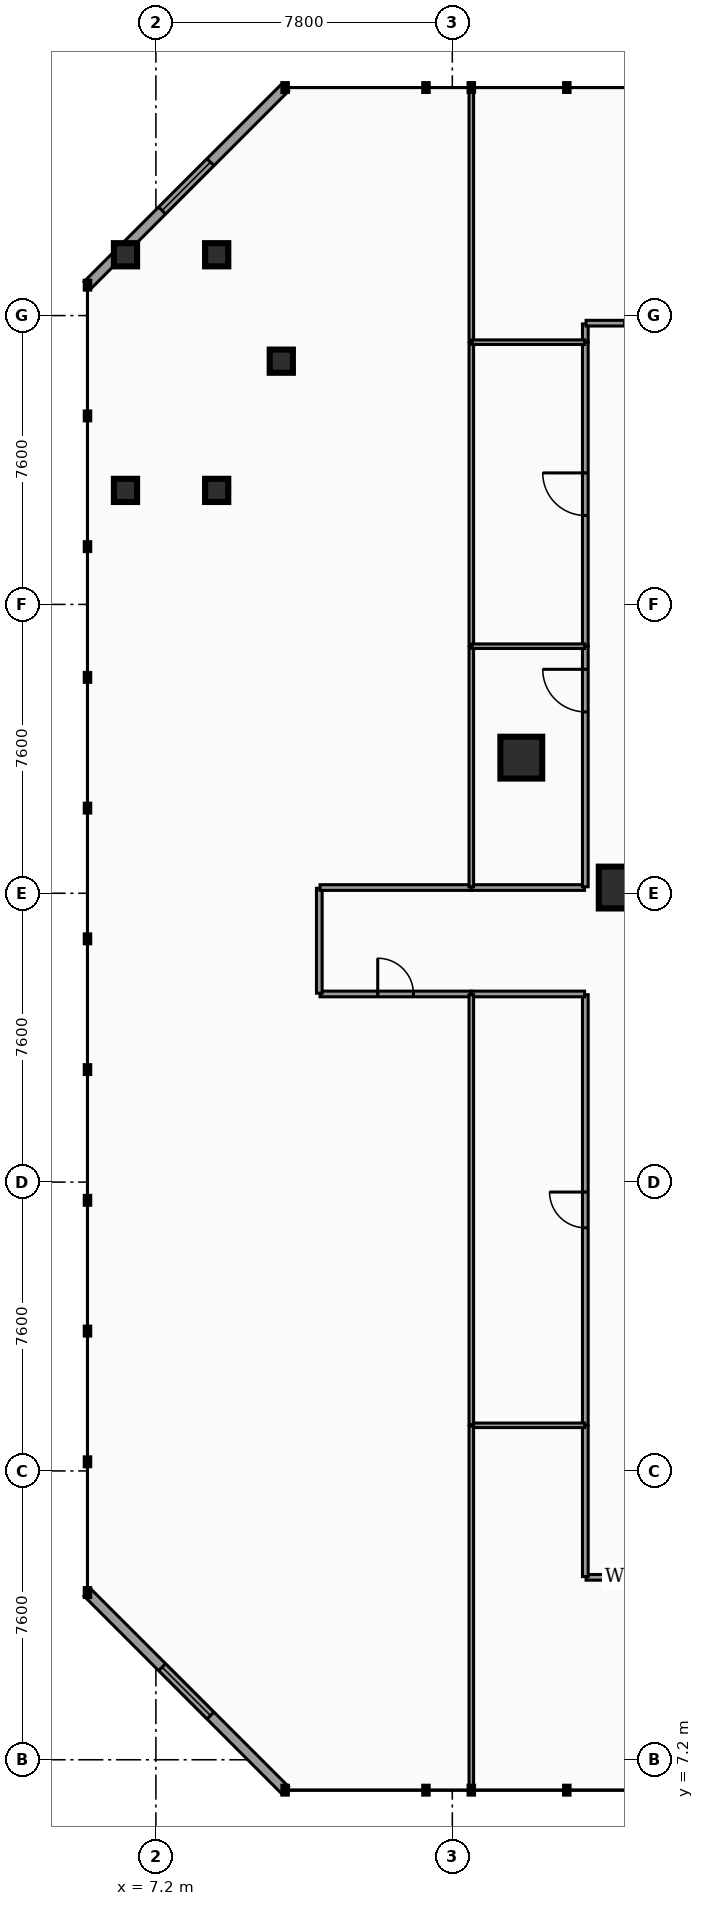
"""IFC4 building model, lengths in metres.
Left out: names, types, materials, properties, quantities, classifications, styles, units other than length and angle.
Written with IfcOpenShell. Run it as: python <this file> out.ifc"""

import sys

from ifc_helpers import new_model, si_unit, direction, frame, frame_2d, origin, origin_2d, place, context, subcontext, project, spatial, rectangle, hollow_rectangle, hollow_circle, extrude, element, fill, save


model = new_model("IFC4")
c1 = context("Model", 3, precision=1e-05, world=origin(), true_north=direction((0.0, 1.0)))
c2 = subcontext(c1, "Body", "Model", "MODEL_VIEW")
j1 = project(units=[si_unit("LENGTHUNIT", "METRE"), si_unit("PLANEANGLEUNIT", "RADIAN")], contexts=[c1])
p1 = place(None, origin())
s1 = spatial("IfcSite", under=j1, at=p1, CompositionType="ELEMENT")
p2 = place(p1, origin())
s2 = spatial("IfcBuilding", under=s1, at=p2, CompositionType="ELEMENT")
p3 = place(p2, frame((0.0, 0.0, 18.36)))
s3 = spatial("IfcBuildingStorey", under=s2, at=p3, CompositionType="ELEMENT", Elevation=18.36)
for number, where, z_axis, x_axis in (
    (1, (16.815, 33.568, 0.0), (0.0, 0.0, 1.0), (1.0, 0.0, 0.0)),
    (2, (19.405, 30.15, 0.0), (0.0, 0.0, 1.0), (1.0, 0.0, 0.0)),
):
    element("IfcColumn", number, at=place(p3, frame(where, z_axis=z_axis, x_axis=x_axis)), inside=s3, PredefinedType="COLUMN", context=c2, shape_type="SweptSolid", body=[
        extrude(hollow_rectangle(XDim=1.1, YDim=1.1, WallThickness=0.055, at=origin_2d()), origin(), (0.0, 0.0, 1.0), 4.07),
    ])
p4 = place(p3, frame((10.5, 44.0, 0.0), z_axis=(0.0, 0.0, 1.0), x_axis=(1.0, 0.0, 0.0)))
e3 = element("IfcColumn", 3, at=p4, inside=s3, PredefinedType="COLUMN", context=c2, shape_type="SweptSolid", body=[
    extrude(hollow_circle(Radius=0.305, WallThickness=0.025, at=origin_2d()), origin(), (0.0, 0.0, 1.0), 4.14),
])
for number, where, z_axis, x_axis in (
    (4, (6.4, 40.6, 0.0), (0.0, 0.0, 1.0), (1.0, 0.0, 0.0)),
    (5, (8.8, 40.6, 0.0), (0.0, 0.0, 1.0), (1.0, 0.0, 0.0)),
    (6, (6.4, 46.8, 0.0), (0.0, 0.0, 1.0), (1.0, 0.0, 0.0)),
    (7, (8.8, 46.8, 0.0), (0.0, 0.0, 1.0), (1.0, 0.0, 0.0)),
):
    element("IfcColumn", number, at=place(p3, frame(where, z_axis=z_axis, x_axis=x_axis)), inside=s3, PredefinedType="COLUMN", context=c2, shape_type="SweptSolid", body=[
        extrude(hollow_circle(Radius=0.305, WallThickness=0.025, at=origin_2d()), origin(), (0.0, 0.0, 1.0), 4.07),
    ])
p5 = place(p3, frame((5.4, 46.0, 0.0), z_axis=(0.0, 0.0, 1.0), x_axis=(0.707123380132, 0.707090181851, 0.0)))
e8 = element("IfcWall", 8, at=p5, inside=s3, PredefinedType="STANDARD", context=c2, shape_type="SweptSolid", body=[
    extrude(rectangle(XDim=7.354, YDim=0.26, at=frame_2d((3.677, 0.0))), origin(), (0.0, 0.0, 1.0), 3.65),
])
p6 = place(p5, frame((2.777, 0.0, 0.7)))
e9 = element("IfcOpeningElement", 9, at=p6, cuts=e8, PredefinedType="OPENING", context=c2, shape_type="SweptSolid", body=[
    extrude(rectangle(XDim=1.8, YDim=2.1, at=frame_2d((0.9, 1.05))), frame((0.0, 0.14, 0.0), z_axis=(0.0, -1.0, 0.0), x_axis=(1.0, 0.0, 0.0)), (0.0, 0.0, 1.0), 0.28),
])
p7 = place(p3, frame((5.4, 11.6, 0.0), z_axis=(0.0, 0.0, 1.0), x_axis=(0.707106781187, -0.707106781187, 0.0)))
e10 = element("IfcWall", 10, at=p7, inside=s3, PredefinedType="STANDARD", context=c2, shape_type="SweptSolid", body=[
    extrude(rectangle(XDim=7.354, YDim=0.26, at=frame_2d((3.677, 0.0))), origin(), (0.0, 0.0, 1.0), 3.65),
])
p8 = place(p7, frame((2.777, 0.0, 0.7)))
e11 = element("IfcOpeningElement", 11, at=p8, cuts=e10, PredefinedType="OPENING", context=c2, shape_type="SweptSolid", body=[
    extrude(rectangle(XDim=1.8, YDim=2.1, at=frame_2d((0.9, 1.05))), frame((0.0, 0.14, 0.0), z_axis=(0.0, -1.0, 0.0), x_axis=(1.0, 0.0, 0.0)), (0.0, 0.0, 1.0), 0.28),
])
p9 = place(p3, frame((18.52, 12.0, 0.0), z_axis=(0.0, 0.0, 1.0), x_axis=(1.0, 0.0, 0.0)))
e12 = element("IfcWall", 12, at=p9, inside=s3, PredefinedType="PARTITIONING", context=c2, shape_type="SweptSolid", body=[
    extrude(rectangle(XDim=2.96, YDim=0.15, at=frame_2d((1.48, 0.0))), origin(), (0.0, 0.0, 1.0), 3.027),
])
p10 = place(p3, frame((18.5, 12.02, 0.0), z_axis=(0.0, 0.0, 1.0), x_axis=(0.0, 1.0, 0.0)))
e13 = element("IfcWall", 13, at=p10, inside=s3, PredefinedType="PARTITIONING", context=c2, shape_type="SweptSolid", body=[
    extrude(rectangle(XDim=3.975, YDim=0.15, at=frame_2d((1.988, 0.0))), origin(), (0.0, 0.0, 1.0), 3.027),
])
p11 = place(p3, frame((18.5, 16.005, 0.0), z_axis=(0.0, 0.0, 1.0), x_axis=(0.0, 1.0, 0.0)))
e14 = element("IfcWall", 14, at=p11, inside=s3, PredefinedType="PARTITIONING", context=c2, shape_type="SweptSolid", body=[
    extrude(rectangle(XDim=11.325, YDim=0.15, at=frame_2d((5.663, 0.0))), origin(), (0.0, 0.0, 1.0), 3.027),
])
p12 = place(p11, frame((5.192, 0.0, 0.0)))
e15 = element("IfcOpeningElement", 15, at=p12, cuts=e14, PredefinedType="OPENING", context=c2, shape_type="SweptSolid", body=[
    extrude(rectangle(XDim=0.94, YDim=2.05, at=frame_2d((0.47, 1.025))), frame((0.0, 0.085, 0.0), z_axis=(0.0, -1.0, 0.0), x_axis=(1.0, 0.0, 0.0)), (0.0, 0.0, 1.0), 0.17),
])
p13 = place(p3, frame((15.505, 27.35, 0.0), z_axis=(0.0, 0.0, 1.0), x_axis=(1.0, 0.0, 0.0)))
e16 = element("IfcWall", 16, at=p13, inside=s3, PredefinedType="PARTITIONING", context=c2, shape_type="SweptSolid", body=[
    extrude(rectangle(XDim=2.975, YDim=0.15, at=frame_2d((1.488, 0.0))), origin(), (0.0, 0.0, 1.0), 3.027),
])
p14 = place(p3, frame((11.52, 27.35, 0.0), z_axis=(0.0, 0.0, 1.0), x_axis=(1.0, 0.0, 0.0)))
e17 = element("IfcWall", 17, at=p14, inside=s3, PredefinedType="PARTITIONING", context=c2, shape_type="SweptSolid", body=[
    extrude(rectangle(XDim=3.975, YDim=0.15, at=frame_2d((1.988, 0.0))), origin(), (0.0, 0.0, 1.0), 3.027),
])
p15 = place(p14, frame((1.518, 0.0, 0.0)))
e18 = element("IfcOpeningElement", 18, at=p15, cuts=e17, PredefinedType="OPENING", context=c2, shape_type="SweptSolid", body=[
    extrude(rectangle(XDim=0.94, YDim=2.05, at=frame_2d((0.47, 1.025))), frame((0.0, 0.085, 0.0), z_axis=(0.0, -1.0, 0.0), x_axis=(1.0, 0.0, 0.0)), (0.0, 0.0, 1.0), 0.17),
])
p16 = place(p3, frame((11.5, 27.37, 0.0), z_axis=(0.0, 0.0, 1.0), x_axis=(0.0, 1.0, 0.0)))
e19 = element("IfcWall", 19, at=p16, inside=s3, PredefinedType="PARTITIONING", context=c2, shape_type="SweptSolid", body=[
    extrude(rectangle(XDim=2.76, YDim=0.15, at=frame_2d((1.38, 0.0))), origin(), (0.0, 0.0, 1.0), 3.027),
])
p17 = place(p3, frame((11.52, 30.15, 0.0), z_axis=(0.0, 0.0, 1.0), x_axis=(1.0, 0.0, 0.0)))
e20 = element("IfcWall", 20, at=p17, inside=s3, PredefinedType="PARTITIONING", context=c2, shape_type="SweptSolid", body=[
    extrude(rectangle(XDim=3.975, YDim=0.15, at=frame_2d((1.988, 0.0))), origin(), (0.0, 0.0, 1.0), 3.027),
])
p18 = place(p3, frame((15.505, 30.15, 0.0), z_axis=(0.0, 0.0, 1.0), x_axis=(1.0, 0.0, 0.0)))
e21 = element("IfcWall", 21, at=p18, inside=s3, PredefinedType="PARTITIONING", context=c2, shape_type="SweptSolid", body=[
    extrude(rectangle(XDim=2.975, YDim=0.15, at=frame_2d((1.488, 0.0))), origin(), (0.0, 0.0, 1.0), 3.027),
])
p19 = place(p3, frame((18.5, 30.17, 0.0), z_axis=(0.0, 0.0, 1.0), x_axis=(0.0, 1.0, 0.0)))
e22 = element("IfcWall", 22, at=p19, inside=s3, PredefinedType="PARTITIONING", context=c2, shape_type="SweptSolid", body=[
    extrude(rectangle(XDim=6.325, YDim=0.15, at=frame_2d((3.163, 0.0))), origin(), (0.0, 0.0, 1.0), 3.027),
])
p20 = place(p19, frame((4.603, 0.0, 0.0)))
e23 = element("IfcOpeningElement", 23, at=p20, cuts=e22, PredefinedType="OPENING", context=c2, shape_type="SweptSolid", body=[
    extrude(rectangle(XDim=1.12, YDim=2.05, at=frame_2d((0.56, 1.025))), frame((0.0, 0.085, 0.0), z_axis=(0.0, -1.0, 0.0), x_axis=(1.0, 0.0, 0.0)), (0.0, 0.0, 1.0), 0.17),
])
p21 = place(p3, frame((18.5, 36.505, 0.0), z_axis=(0.0, 0.0, 1.0), x_axis=(0.0, 1.0, 0.0)))
e24 = element("IfcWall", 24, at=p21, inside=s3, PredefinedType="PARTITIONING", context=c2, shape_type="SweptSolid", body=[
    extrude(rectangle(XDim=7.99, YDim=0.15, at=frame_2d((3.995, 0.0))), origin(), (0.0, 0.0, 1.0), 3.027),
])
p22 = place(p21, frame((3.435, 0.0, 0.0)))
e25 = element("IfcOpeningElement", 25, at=p22, cuts=e24, PredefinedType="OPENING", context=c2, shape_type="SweptSolid", body=[
    extrude(rectangle(XDim=1.12, YDim=2.05, at=frame_2d((0.56, 1.025))), frame((0.0, 0.085, 0.0), z_axis=(0.0, -1.0, 0.0), x_axis=(1.0, 0.0, 0.0)), (0.0, 0.0, 1.0), 0.17),
])
p23 = place(p3, frame((18.5, 44.505, 0.0), z_axis=(0.0, 0.0, 1.0), x_axis=(0.0, 1.0, 0.0)))
e26 = element("IfcWall", 26, at=p23, inside=s3, PredefinedType="PARTITIONING", context=c2, shape_type="SweptSolid", body=[
    extrude(rectangle(XDim=0.475, YDim=0.15, at=frame_2d((0.238, 0.0))), origin(), (0.0, 0.0, 1.0), 3.027),
])
p24 = place(p3, frame((18.52, 45.0, 0.0), z_axis=(0.0, 0.0, 1.0), x_axis=(1.0, 0.0, 0.0)))
e27 = element("IfcWall", 27, at=p24, inside=s3, PredefinedType="PARTITIONING", context=c2, shape_type="SweptSolid", body=[
    extrude(rectangle(XDim=2.96, YDim=0.15, at=frame_2d((1.48, 0.0))), origin(), (0.0, 0.0, 1.0), 3.027),
])
p25 = place(p24, frame((1.01, 0.0, 0.0)))
e28 = element("IfcOpeningElement", 28, at=p25, cuts=e27, PredefinedType="OPENING", context=c2, shape_type="SweptSolid", body=[
    extrude(rectangle(XDim=0.94, YDim=2.05, at=frame_2d((0.47, 1.025))), frame((0.0, 0.085, 0.0), z_axis=(0.0, -1.0, 0.0), x_axis=(1.0, 0.0, 0.0)), (0.0, 0.0, 1.0), 0.17),
])
p26 = place(p3, frame((15.52, 16.0, 0.0), z_axis=(0.0, 0.0, 1.0), x_axis=(1.0, 0.0, 0.0)))
e29 = element("IfcWall", 29, at=p26, inside=s3, PredefinedType="PARTITIONING", context=c2, shape_type="SweptSolid", body=[
    extrude(rectangle(XDim=2.96, YDim=0.12, at=frame_2d((1.48, 0.0))), origin(), (0.0, 0.0, 1.0), 3.027),
])
p27 = place(p3, frame((15.5, 6.415, 0.0), z_axis=(0.0, 0.0, 1.0), x_axis=(0.0, 1.0, 0.0)))
e30 = element("IfcWall", 30, at=p27, inside=s3, PredefinedType="PARTITIONING", context=c2, shape_type="SweptSolid", body=[
    extrude(rectangle(XDim=9.565, YDim=0.12, at=frame_2d((4.782, 0.0))), origin(), (0.0, 0.0, 1.0), 3.027),
])
p28 = place(p3, frame((15.5, 16.02, 0.0), z_axis=(0.0, 0.0, 1.0), x_axis=(0.0, 1.0, 0.0)))
e31 = element("IfcWall", 31, at=p28, inside=s3, PredefinedType="PARTITIONING", context=c2, shape_type="SweptSolid", body=[
    extrude(rectangle(XDim=11.31, YDim=0.12, at=frame_2d((5.655, 0.0))), origin(), (0.0, 0.0, 1.0), 3.027),
])
p29 = place(p3, frame((15.5, 30.17, 0.0), z_axis=(0.0, 0.0, 1.0), x_axis=(0.0, 1.0, 0.0)))
e32 = element("IfcWall", 32, at=p29, inside=s3, PredefinedType="PARTITIONING", context=c2, shape_type="SweptSolid", body=[
    extrude(rectangle(XDim=6.31, YDim=0.12, at=frame_2d((3.155, 0.0))), origin(), (0.0, 0.0, 1.0), 3.027),
])
p30 = place(p3, frame((15.5, 36.52, 0.0), z_axis=(0.0, 0.0, 1.0), x_axis=(0.0, 1.0, 0.0)))
e33 = element("IfcWall", 33, at=p30, inside=s3, PredefinedType="PARTITIONING", context=c2, shape_type="SweptSolid", body=[
    extrude(rectangle(XDim=7.96, YDim=0.12, at=frame_2d((3.98, 0.0))), origin(), (0.0, 0.0, 1.0), 3.027),
])
p31 = place(p3, frame((15.5, 44.52, 0.0), z_axis=(0.0, 0.0, 1.0), x_axis=(0.0, 1.0, 0.0)))
e34 = element("IfcWall", 34, at=p31, inside=s3, PredefinedType="PARTITIONING", context=c2, shape_type="SweptSolid", body=[
    extrude(rectangle(XDim=6.665, YDim=0.12, at=frame_2d((3.333, 0.0))), origin(), (0.0, 0.0, 1.0), 3.027),
])
for number, where, z_axis, x_axis in (
    (35, (15.52, 36.5, 0.0), (0.0, 0.0, 1.0), (1.0, 0.0, 0.0)),
    (36, (15.52, 44.5, 0.0), (0.0, 0.0, 1.0), (1.0, 0.0, 0.0)),
):
    element("IfcWall", number, at=place(p3, frame(where, z_axis=z_axis, x_axis=x_axis)), inside=s3, PredefinedType="PARTITIONING", context=c2, shape_type="SweptSolid", body=[
        extrude(rectangle(XDim=2.96, YDim=0.12, at=frame_2d((1.48, 0.0))), origin(), (0.0, 0.0, 1.0), 3.027),
    ])
p32 = place(p6, origin())
e37 = element("IfcWindow", 37, at=p32, inside=s3, PartitioningType="SINGLE_PANEL", PredefinedType="WINDOW", context=c2, shape_type="SweptSolid", body=[
    extrude(rectangle(XDim=1.8, YDim=2.1, at=frame_2d((0.9, 1.05))), frame((0.0, 0.03, 0.0), z_axis=(0.0, -1.0, 0.0), x_axis=(1.0, 0.0, 0.0)), (0.0, 0.0, 1.0), 0.06),
])
fill(e9, e37)
p33 = place(p8, origin())
e38 = element("IfcWindow", 38, at=p33, inside=s3, PartitioningType="SINGLE_PANEL", PredefinedType="WINDOW", context=c2, shape_type="SweptSolid", body=[
    extrude(rectangle(XDim=1.8, YDim=2.1, at=frame_2d((0.9, 1.05))), frame((0.0, 0.03, 0.0), z_axis=(0.0, -1.0, 0.0), x_axis=(1.0, 0.0, 0.0)), (0.0, 0.0, 1.0), 0.06),
])
fill(e11, e38)
p34 = place(p12, origin())
e39 = element("IfcDoor", 39, at=p34, inside=s3, OperationType="SINGLE_SWING_RIGHT", PredefinedType="DOOR", context=c2, shape_type="SweptSolid", body=[
    extrude(rectangle(XDim=0.94, YDim=2.05, at=frame_2d((0.47, 1.025))), frame((0.0, 0.025, 0.0), z_axis=(0.0, -1.0, 0.0), x_axis=(1.0, 0.0, 0.0)), (0.0, 0.0, 1.0), 0.05),
])
fill(e15, e39)
p35 = place(p15, origin())
e40 = element("IfcDoor", 40, at=p35, inside=s3, OperationType="SINGLE_SWING_LEFT", PredefinedType="DOOR", context=c2, shape_type="SweptSolid", body=[
    extrude(rectangle(XDim=0.94, YDim=2.05, at=frame_2d((0.47, 1.025))), frame((0.0, 0.025, 0.0), z_axis=(0.0, -1.0, 0.0), x_axis=(1.0, 0.0, 0.0)), (0.0, 0.0, 1.0), 0.05),
])
fill(e18, e40)
p36 = place(p20, origin())
e41 = element("IfcDoor", 41, at=p36, inside=s3, OperationType="SINGLE_SWING_RIGHT", PredefinedType="DOOR", context=c2, shape_type="SweptSolid", body=[
    extrude(rectangle(XDim=1.12, YDim=2.05, at=frame_2d((0.56, 1.025))), frame((0.0, 0.025, 0.0), z_axis=(0.0, -1.0, 0.0), x_axis=(1.0, 0.0, 0.0)), (0.0, 0.0, 1.0), 0.05),
])
fill(e23, e41)
p37 = place(p22, origin())
e42 = element("IfcDoor", 42, at=p37, inside=s3, OperationType="SINGLE_SWING_RIGHT", PredefinedType="DOOR", context=c2, shape_type="SweptSolid", body=[
    extrude(rectangle(XDim=1.12, YDim=2.05, at=frame_2d((0.56, 1.025))), frame((0.0, 0.025, 0.0), z_axis=(0.0, -1.0, 0.0), x_axis=(1.0, 0.0, 0.0)), (0.0, 0.0, 1.0), 0.05),
])
fill(e25, e42)
save(model, sys.argv[1])
